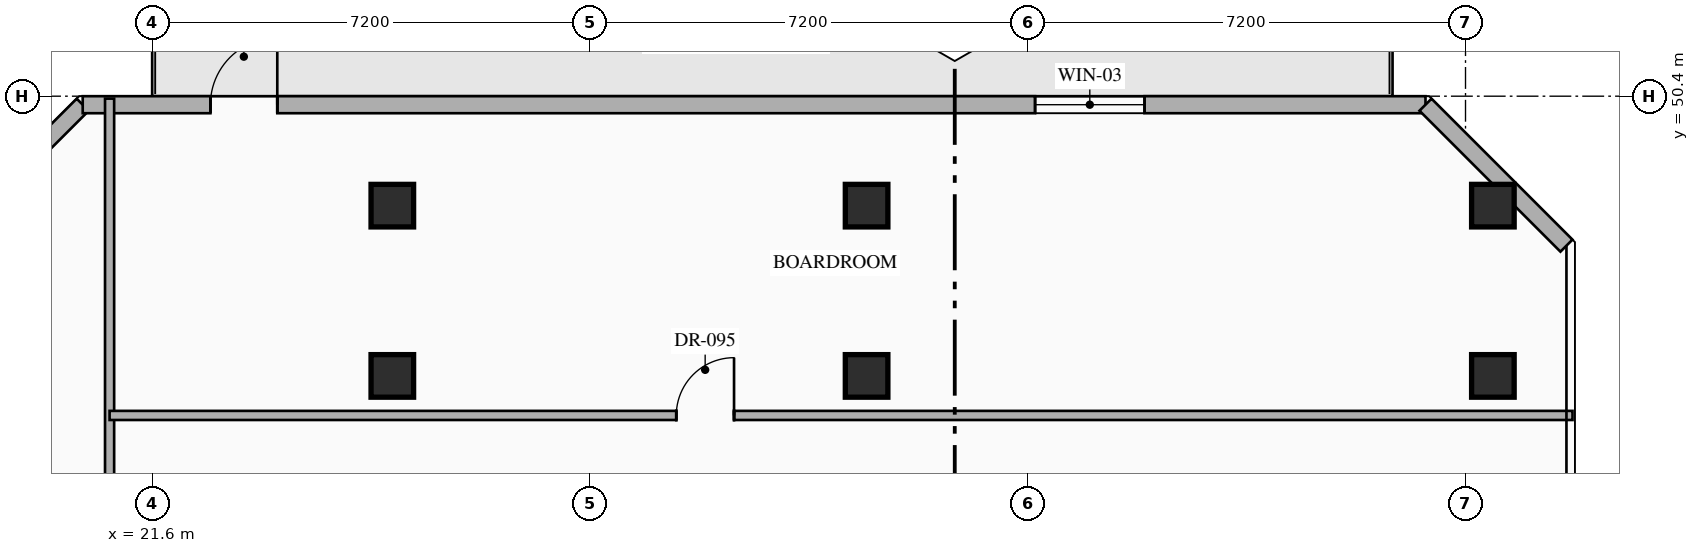
"""IFC4 building model, lengths in metres.
Left out: names, types, materials, properties, quantities, classifications, styles, units other than length and angle.
Written with IfcOpenShell. Run it as: python <this file> out.ifc"""

import sys

from ifc_helpers import new_model, si_unit, direction, frame, frame_2d, origin, origin_2d, place, context, subcontext, project, spatial, rectangle, hollow_rectangle, extrude, element, fill, save


model = new_model("IFC4")
c1 = context("Model", 3, precision=1e-05, world=origin(), true_north=direction((0.0, 1.0)))
c2 = subcontext(c1, "Body", "Model", "MODEL_VIEW")
j1 = project(units=[si_unit("LENGTHUNIT", "METRE"), si_unit("PLANEANGLEUNIT", "RADIAN")], contexts=[c1])
p1 = place(None, origin())
s1 = spatial("IfcSite", under=j1, at=p1, CompositionType="ELEMENT")
p2 = place(p1, origin())
s2 = spatial("IfcBuilding", under=s1, at=p2, CompositionType="ELEMENT")
p3 = place(p2, frame((0.0, 0.0, 220.35)))
s3 = spatial("IfcBuildingStorey", under=s2, at=p3, CompositionType="ELEMENT", Elevation=220.35)
for number, where, z_axis, x_axis in (
    (1, (25.55, 45.8, 0.0), (0.0, 0.0, 1.0), (1.0, 0.0, 0.0)),
    (2, (33.35, 45.8, 0.0), (0.0, 0.0, 1.0), (1.0, 0.0, 0.0)),
    (3, (43.65, 45.8, 0.0), (0.0, 0.0, 1.0), (1.0, 0.0, 0.0)),
    (4, (25.55, 48.6, 0.0), (0.0, 0.0, 1.0), (1.0, 0.0, 0.0)),
    (5, (33.35, 48.6, 0.0), (0.0, 0.0, 1.0), (1.0, 0.0, 0.0)),
    (6, (43.65, 48.6, 0.0), (0.0, 0.0, 1.0), (1.0, 0.0, 0.0)),
):
    element("IfcColumn", number, at=place(p3, frame(where, z_axis=z_axis, x_axis=x_axis)), inside=s3, PredefinedType="COLUMN", context=c2, shape_type="SweptSolid", body=[
        extrude(hollow_rectangle(XDim=0.7, YDim=0.7, WallThickness=0.028, at=origin_2d()), origin(), (0.0, 0.0, 1.0), 3.6),
    ])
p4 = place(p3, frame((18.14, 47.942, 0.0), z_axis=(0.0, 0.0, 1.0), x_axis=(0.707106781187, 0.707106781187, 0.0)))
e7 = element("IfcWall", 7, at=p4, inside=s3, PredefinedType="STANDARD", context=c2, shape_type="SweptSolid", body=[
    extrude(rectangle(XDim=3.278, YDim=0.28, at=frame_2d((1.639, 0.0))), origin(), (0.0, 0.0, 1.0), 3.35),
])
p5 = place(p3, frame((20.458, 50.26, 0.0), z_axis=(0.0, 0.0, 1.0), x_axis=(1.0, 0.0, 0.0)))
e8 = element("IfcWall", 8, at=p5, inside=s3, PredefinedType="STANDARD", context=c2, shape_type="SweptSolid", body=[
    extrude(rectangle(XDim=22.084, YDim=0.28, at=frame_2d((11.042, 0.0))), origin(), (0.0, 0.0, 1.0), 3.35),
])
p6 = place(p5, frame((2.1, 0.0, 0.0)))
e9 = element("IfcOpeningElement", 9, at=p6, cuts=e8, PredefinedType="OPENING", context=c2, shape_type="SweptSolid", body=[
    extrude(rectangle(XDim=1.1, YDim=2.2, at=frame_2d((0.55, 1.1))), frame((0.0, 0.15, 0.0), z_axis=(0.0, -1.0, 0.0), x_axis=(1.0, 0.0, 0.0)), (0.0, 0.0, 1.0), 0.3),
])
p7 = place(p5, frame((15.663, 0.0, 0.85)))
e10 = element("IfcOpeningElement", 10, at=p7, cuts=e8, PredefinedType="OPENING", context=c2, shape_type="SweptSolid", body=[
    extrude(rectangle(XDim=1.8, YDim=2.1, at=frame_2d((0.9, 1.05))), frame((0.0, 0.15, 0.0), z_axis=(0.0, -1.0, 0.0), x_axis=(1.0, 0.0, 0.0)), (0.0, 0.0, 1.0), 0.3),
])
p8 = place(p3, frame((42.542, 50.26, 0.0), z_axis=(0.0, 0.0, 1.0), x_axis=(0.707106781187, -0.707106781187, 0.0)))
e11 = element("IfcWall", 11, at=p8, inside=s3, PredefinedType="STANDARD", context=c2, shape_type="SweptSolid", body=[
    extrude(rectangle(XDim=3.278, YDim=0.28, at=frame_2d((1.639, 0.0))), origin(), (0.0, 0.0, 1.0), 3.35),
])
p9 = place(p3, frame((20.9, 23.44, 0.0), z_axis=(0.0, 0.0, 1.0), x_axis=(0.0, 1.0, 0.0)))
e12 = element("IfcWall", 12, at=p9, inside=s3, PredefinedType="PARTITIONING", context=c2, shape_type="SweptSolid", body=[
    extrude(rectangle(XDim=26.92, YDim=0.15, at=frame_2d((13.46, 0.0))), origin(), (0.0, 0.0, 1.0), 3.35),
])
p10 = place(p9, frame((7.943, 0.0, 0.0)))
e13 = element("IfcOpeningElement", 13, at=p10, cuts=e12, PredefinedType="OPENING", context=c2, shape_type="SweptSolid", body=[
    extrude(rectangle(XDim=0.95, YDim=2.15, at=frame_2d((0.475, 1.075))), frame((0.0, 0.085, 0.0), z_axis=(0.0, -1.0, 0.0), x_axis=(1.0, 0.0, 0.0)), (0.0, 0.0, 1.0), 0.17),
])
p11 = place(p3, frame((20.9, 45.15, 0.0), z_axis=(0.0, 0.0, 1.0), x_axis=(1.0, 0.0, 0.0)))
e14 = element("IfcWall", 14, at=p11, inside=s3, PredefinedType="PARTITIONING", context=c2, shape_type="SweptSolid", body=[
    extrude(rectangle(XDim=24.06, YDim=0.15, at=frame_2d((12.03, 0.0))), origin(), (0.0, 0.0, 1.0), 3.35),
])
p12 = place(p11, frame((9.32, 0.0, 0.0)))
e15 = element("IfcOpeningElement", 15, at=p12, cuts=e14, PredefinedType="OPENING", context=c2, shape_type="SweptSolid", body=[
    extrude(rectangle(XDim=0.95, YDim=2.15, at=frame_2d((0.475, 1.075))), frame((0.0, 0.085, 0.0), z_axis=(0.0, -1.0, 0.0), x_axis=(1.0, 0.0, 0.0)), (0.0, 0.0, 1.0), 0.17),
])
p13 = place(p6, origin())
e16 = element("IfcDoor", 16, at=p13, inside=s3, OperationType="SINGLE_SWING_RIGHT", PredefinedType="DOOR", context=c2, shape_type="SweptSolid", body=[
    extrude(rectangle(XDim=1.1, YDim=2.2, at=frame_2d((0.55, 1.1))), frame((0.0, 0.025, 0.0), z_axis=(0.0, -1.0, 0.0), x_axis=(1.0, 0.0, 0.0)), (0.0, 0.0, 1.0), 0.05),
])
fill(e9, e16)
p14 = place(p7, origin())
e17 = element("IfcWindow", 17, at=p14, inside=s3, PartitioningType="SINGLE_PANEL", PredefinedType="WINDOW", context=c2, shape_type="SweptSolid", body=[
    extrude(rectangle(XDim=1.8, YDim=2.1, at=frame_2d((0.9, 1.05))), frame((0.0, 0.03, 0.0), z_axis=(0.0, -1.0, 0.0), x_axis=(1.0, 0.0, 0.0)), (0.0, 0.0, 1.0), 0.06),
])
fill(e10, e17)
p15 = place(p12, origin())
e18 = element("IfcDoor", 18, at=p15, inside=s3, OperationType="SINGLE_SWING_RIGHT", PredefinedType="DOOR", context=c2, shape_type="SweptSolid", body=[
    extrude(rectangle(XDim=0.95, YDim=2.15, at=frame_2d((0.475, 1.075))), frame((0.0, 0.025, 0.0), z_axis=(0.0, -1.0, 0.0), x_axis=(1.0, 0.0, 0.0)), (0.0, 0.0, 1.0), 0.05),
])
fill(e15, e18)
save(model, sys.argv[1])
